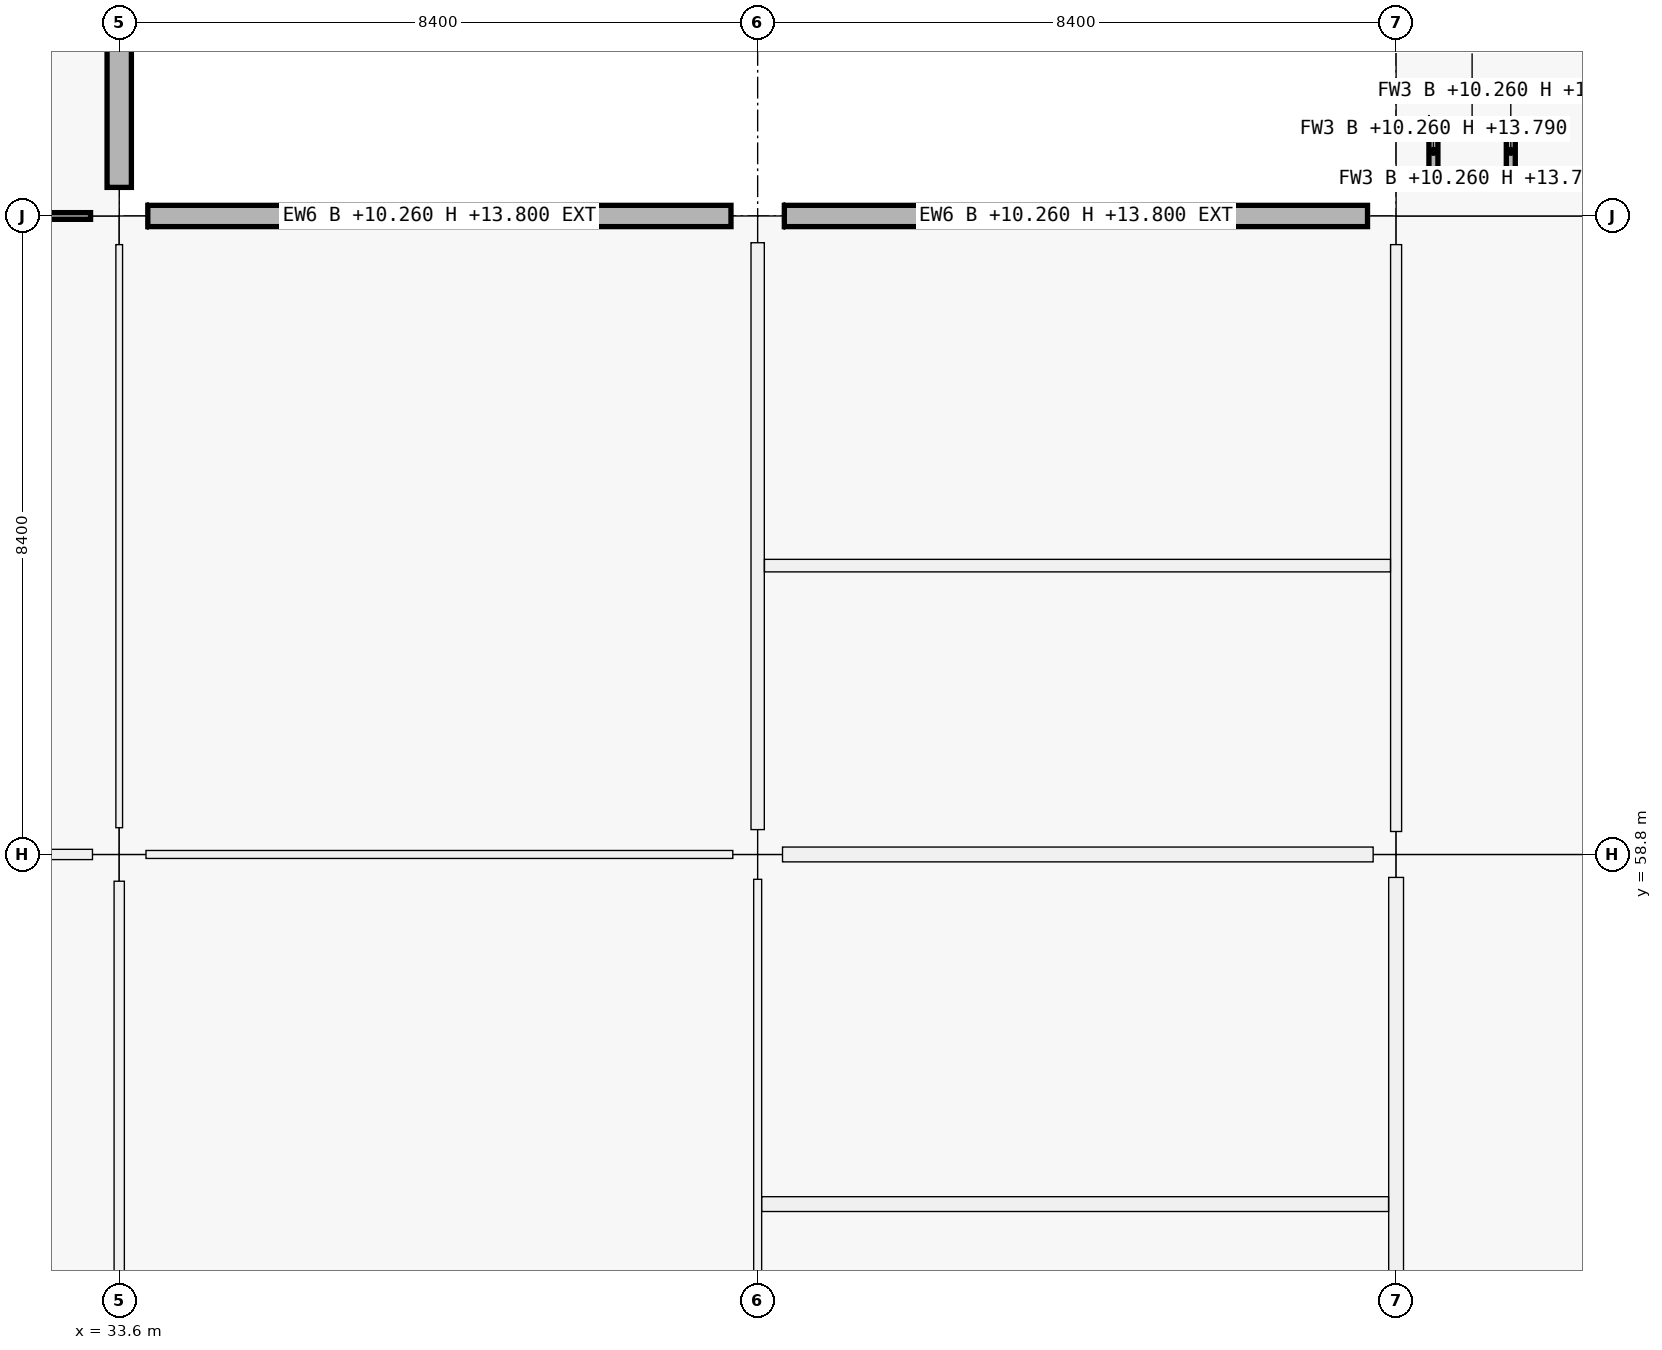
"""IFC4 building model, lengths in metres.
Left out: names, types, materials, properties, quantities, classifications, styles, units other than length and angle.
Written with IfcOpenShell. Run it as: python <this file> out.ifc"""

import sys

from ifc_helpers import new_model, si_unit, direction, frame, frame_2d, origin, origin_2d, place, context, subcontext, project, spatial, rectangle, extrude, element, fill, save


model = new_model("IFC4")
c1 = context("Model", 3, precision=1e-05, world=origin(), true_north=direction((0.0, 1.0)))
c2 = subcontext(c1, "Body", "Model", "MODEL_VIEW")
j1 = project(units=[si_unit("LENGTHUNIT", "METRE"), si_unit("PLANEANGLEUNIT", "RADIAN")], contexts=[c1])
p1 = place(None, origin())
s1 = spatial("IfcSite", under=j1, at=p1, CompositionType="ELEMENT")
p2 = place(p1, origin())
s2 = spatial("IfcBuilding", under=s1, at=p2, CompositionType="ELEMENT")
p3 = place(p2, frame((0.0, 0.0, 10.26)))
s3 = spatial("IfcBuildingStorey", under=s2, at=p3, CompositionType="ELEMENT", Elevation=10.26)
p4 = place(p3, frame((33.6, 58.8, 0.0), z_axis=(0.0, 0.0, 1.0), x_axis=(1.0, 0.0, 0.0)))
e1 = element("IfcColumn", 1, at=p4, inside=s3, PredefinedType="COLUMN", context=c2, shape_type="SweptSolid", body=[
    extrude(rectangle(XDim=0.7, YDim=0.7, at=origin_2d()), origin(), (0.0, 0.0, 1.0), 4.5),
])
p5 = place(p3, frame((33.6, 67.2, 0.0), z_axis=(0.0, 0.0, 1.0), x_axis=(1.0, 0.0, 0.0)))
e2 = element("IfcColumn", 2, at=p5, inside=s3, PredefinedType="COLUMN", context=c2, shape_type="SweptSolid", body=[
    extrude(rectangle(XDim=0.75, YDim=0.75, at=origin_2d()), origin(), (0.0, 0.0, 1.0), 4.5),
])
p6 = place(p3, frame((42.0, 58.8, 0.0), z_axis=(0.0, 0.0, 1.0), x_axis=(1.0, 0.0, 0.0)))
e3 = element("IfcColumn", 3, at=p6, inside=s3, PredefinedType="COLUMN", context=c2, shape_type="SweptSolid", body=[
    extrude(rectangle(XDim=0.65, YDim=0.65, at=origin_2d()), origin(), (0.0, 0.0, 1.0), 4.5),
])
p7 = place(p3, frame((42.0, 67.2, 0.0), z_axis=(0.0, 0.0, 1.0), x_axis=(1.0, 0.0, 0.0)))
e4 = element("IfcColumn", 4, at=p7, inside=s3, PredefinedType="COLUMN", context=c2, shape_type="SweptSolid", body=[
    extrude(rectangle(XDim=0.7, YDim=0.7, at=origin_2d()), origin(), (0.0, 0.0, 1.0), 4.5),
])
p8 = place(p3, frame((50.4, 58.8, 0.0), z_axis=(0.0, 0.0, 1.0), x_axis=(1.0, 0.0, 0.0)))
e5 = element("IfcColumn", 5, at=p8, inside=s3, PredefinedType="COLUMN", context=c2, shape_type="SweptSolid", body=[
    extrude(rectangle(XDim=0.6, YDim=0.6, at=origin_2d()), origin(), (0.0, 0.0, 1.0), 4.5),
])
p9 = place(p3, frame((50.4, 67.2, 0.0), z_axis=(0.0, 0.0, 1.0), x_axis=(1.0, 0.0, 0.0)))
e6 = element("IfcColumn", 6, at=p9, inside=s3, PredefinedType="COLUMN", context=c2, shape_type="SweptSolid", body=[
    extrude(rectangle(XDim=0.75, YDim=0.75, at=origin_2d()), origin(), (0.0, 0.0, 1.0), 4.5),
])
p10 = place(p3, frame((33.6, 75.249, 0.0), z_axis=(0.0, 0.0, 1.0), x_axis=(0.0, -1.0, 0.0)))
e7 = element("IfcWall", 7, at=p10, inside=s3, PredefinedType="SOLIDWALL", context=c2, shape_type="SweptSolid", body=[
    extrude(rectangle(XDim=7.673, YDim=0.32, at=frame_2d((3.836, 0.0))), origin(), (0.0, 0.0, 1.0), 3.54),
])
p11 = place(p10, frame((2.486, 0.0, 0.9)))
e8 = element("IfcOpeningElement", 8, at=p11, cuts=e7, PredefinedType="OPENING", context=c2, shape_type="SweptSolid", body=[
    extrude(rectangle(XDim=2.7, YDim=1.2, at=frame_2d((1.35, 0.6))), frame((0.0, 0.16, 0.0), z_axis=(0.0, -1.0, 0.0), x_axis=(1.0, 0.0, 0.0)), (0.0, 0.0, 1.0), 0.32),
])
p12 = place(p3, frame((33.976, 67.2, 0.0), z_axis=(0.0, 0.0, 1.0), x_axis=(1.0, 0.0, 0.0)))
e9 = element("IfcWall", 9, at=p12, inside=s3, PredefinedType="SOLIDWALL", context=c2, shape_type="SweptSolid", body=[
    extrude(rectangle(XDim=7.673, YDim=0.28, at=frame_2d((3.836, 0.0))), origin(), (0.0, 0.0, 1.0), 3.54),
])
p13 = place(p12, frame((2.937, 0.0, 0.9)))
e10 = element("IfcOpeningElement", 10, at=p13, cuts=e9, PredefinedType="OPENING", context=c2, shape_type="SweptSolid", body=[
    extrude(rectangle(XDim=1.8, YDim=1.35, at=frame_2d((0.9, 0.675))), frame((0.0, 0.14, 0.0), z_axis=(0.0, -1.0, 0.0), x_axis=(1.0, 0.0, 0.0)), (0.0, 0.0, 1.0), 0.28),
])
p14 = place(p3, frame((42.351, 67.2, 0.0), z_axis=(0.0, 0.0, 1.0), x_axis=(1.0, 0.0, 0.0)))
e11 = element("IfcWall", 11, at=p14, inside=s3, PredefinedType="SOLIDWALL", context=c2, shape_type="SweptSolid", body=[
    extrude(rectangle(XDim=7.673, YDim=0.28, at=frame_2d((3.836, 0.0))), origin(), (0.0, 0.0, 1.0), 3.54),
])
p15 = place(p14, frame((3.136, 0.0, 0.9)))
e12 = element("IfcOpeningElement", 12, at=p15, cuts=e11, PredefinedType="OPENING", context=c2, shape_type="SweptSolid", body=[
    extrude(rectangle(XDim=1.4, YDim=1.75, at=frame_2d((0.7, 0.875))), frame((0.0, 0.14, 0.0), z_axis=(0.0, -1.0, 0.0), x_axis=(1.0, 0.0, 0.0)), (0.0, 0.0, 1.0), 0.28),
])
for number, where, z_axis, x_axis in (
    (13, (50.832, 67.691, 0.0), (0.0, 0.0, 1.0), (1.0, 0.0, 0.0)),
    (14, (50.832, 68.409, 0.0), (0.0, 0.0, 1.0), (1.0, 0.0, 0.0)),
):
    element("IfcWall", number, at=place(p3, frame(where, z_axis=z_axis, x_axis=x_axis)), inside=s3, PredefinedType="PARTITIONING", context=c2, shape_type="SweptSolid", body=[
        extrude(rectangle(XDim=1.136, YDim=0.118, at=frame_2d((0.568, 0.0))), origin(), (0.0, 0.0, 1.0), 3.53),
    ])
for number, where, z_axis, x_axis in (
    (15, (50.891, 67.75, 0.0), (0.0, 0.0, 1.0), (0.0, 1.0, 0.0)),
    (16, (51.909, 67.75, 0.0), (0.0, 0.0, 1.0), (0.0, 1.0, 0.0)),
):
    element("IfcWall", number, at=place(p3, frame(where, z_axis=z_axis, x_axis=x_axis)), inside=s3, PredefinedType="PARTITIONING", context=c2, shape_type="SweptSolid", body=[
        extrude(rectangle(XDim=0.6, YDim=0.118, at=frame_2d((0.3, 0.0))), origin(), (0.0, 0.0, 1.0), 3.53),
    ])
p16 = place(p3, frame((25.577, 58.8, 0.0), z_axis=(0.0, 0.0, 1.0), x_axis=(1.0, 0.0, 0.0)))
e17 = element("IfcWall", 17, at=p16, inside=s3, PredefinedType="PARTITIONING", context=c2, shape_type="SweptSolid", body=[
    extrude(rectangle(XDim=7.671, YDim=0.135, at=frame_2d((3.835, 0.0))), origin(), (0.0, 0.0, 1.0), 3.37),
])
p17 = place(p16, frame((3.306, 0.0, 0.0)))
e18 = element("IfcOpeningElement", 18, at=p17, cuts=e17, PredefinedType="OPENING", context=c2, shape_type="SweptSolid", body=[
    extrude(rectangle(XDim=1.06, YDim=2.25, at=frame_2d((0.53, 1.125))), frame((0.0, 0.067, 0.0), z_axis=(0.0, -1.0, 0.0), x_axis=(1.0, 0.0, 0.0)), (0.0, 0.0, 1.0), 0.135),
])
p18 = place(p3, frame((25.552, 67.2, 0.0), z_axis=(0.0, 0.0, 1.0), x_axis=(1.0, 0.0, 0.0)))
e19 = element("IfcWall", 19, at=p18, inside=s3, PredefinedType="PARTITIONING", context=c2, shape_type="SweptSolid", body=[
    extrude(rectangle(XDim=7.671, YDim=0.088, at=frame_2d((3.835, 0.0))), origin(), (0.0, 0.0, 1.0), 3.37),
])
p19 = place(p18, frame((3.316, 0.0, 0.0)))
e20 = element("IfcOpeningElement", 20, at=p19, cuts=e19, PredefinedType="OPENING", context=c2, shape_type="SweptSolid", body=[
    extrude(rectangle(XDim=1.04, YDim=2.2, at=frame_2d((0.52, 1.1))), frame((0.0, 0.044, 0.0), z_axis=(0.0, -1.0, 0.0), x_axis=(1.0, 0.0, 0.0)), (0.0, 0.0, 1.0), 0.088),
])
p20 = place(p3, frame((33.952, 58.8, 0.0), z_axis=(0.0, 0.0, 1.0), x_axis=(1.0, 0.0, 0.0)))
e21 = element("IfcWall", 21, at=p20, inside=s3, PredefinedType="PARTITIONING", context=c2, shape_type="SweptSolid", body=[
    extrude(rectangle(XDim=7.721, YDim=0.105, at=frame_2d((3.861, 0.0))), origin(), (0.0, 0.0, 1.0), 3.37),
])
p21 = place(p20, frame((3.351, 0.0, 0.0)))
e22 = element("IfcOpeningElement", 22, at=p21, cuts=e21, PredefinedType="OPENING", context=c2, shape_type="SweptSolid", body=[
    extrude(rectangle(XDim=1.02, YDim=2.2, at=frame_2d((0.51, 1.1))), frame((0.0, 0.052, 0.0), z_axis=(0.0, -1.0, 0.0), x_axis=(1.0, 0.0, 0.0)), (0.0, 0.0, 1.0), 0.105),
])
p22 = place(p3, frame((42.327, 58.8, 0.0), z_axis=(0.0, 0.0, 1.0), x_axis=(1.0, 0.0, 0.0)))
e23 = element("IfcWall", 23, at=p22, inside=s3, PredefinedType="PARTITIONING", context=c2, shape_type="SweptSolid", body=[
    extrude(rectangle(XDim=7.771, YDim=0.195, at=frame_2d((3.885, 0.0))), origin(), (0.0, 0.0, 1.0), 3.37),
])
p23 = place(p3, frame((33.6, 50.777, 0.0), z_axis=(0.0, 0.0, 1.0), x_axis=(0.0, 1.0, 0.0)))
e24 = element("IfcWall", 24, at=p23, inside=s3, PredefinedType="PARTITIONING", context=c2, shape_type="SweptSolid", body=[
    extrude(rectangle(XDim=7.671, YDim=0.135, at=frame_2d((3.835, 0.0))), origin(), (0.0, 0.0, 1.0), 3.37),
])
p24 = place(p23, frame((3.336, 0.0, 0.0)))
e25 = element("IfcOpeningElement", 25, at=p24, cuts=e24, PredefinedType="OPENING", context=c2, shape_type="SweptSolid", body=[
    extrude(rectangle(XDim=1.0, YDim=2.2, at=frame_2d((0.5, 1.1))), frame((0.0, 0.067, 0.0), z_axis=(0.0, -1.0, 0.0), x_axis=(1.0, 0.0, 0.0)), (0.0, 0.0, 1.0), 0.135),
])
p25 = place(p3, frame((33.6, 59.152, 0.0), z_axis=(0.0, 0.0, 1.0), x_axis=(0.0, 1.0, 0.0)))
e26 = element("IfcWall", 26, at=p25, inside=s3, PredefinedType="PARTITIONING", context=c2, shape_type="SweptSolid", body=[
    extrude(rectangle(XDim=7.671, YDim=0.088, at=frame_2d((3.835, 0.0))), origin(), (0.0, 0.0, 1.0), 3.37),
])
p26 = place(p25, frame((3.365, 0.0, 0.0)))
e27 = element("IfcOpeningElement", 27, at=p26, cuts=e26, PredefinedType="OPENING", context=c2, shape_type="SweptSolid", body=[
    extrude(rectangle(XDim=0.94, YDim=2.15, at=frame_2d((0.47, 1.075))), frame((0.0, 0.044, 0.0), z_axis=(0.0, -1.0, 0.0), x_axis=(1.0, 0.0, 0.0)), (0.0, 0.0, 1.0), 0.088),
])
p27 = place(p3, frame((42.0, 50.702, 0.0), z_axis=(0.0, 0.0, 1.0), x_axis=(0.0, 1.0, 0.0)))
e28 = element("IfcWall", 28, at=p27, inside=s3, PredefinedType="PARTITIONING", context=c2, shape_type="SweptSolid", body=[
    extrude(rectangle(XDim=7.771, YDim=0.105, at=frame_2d((3.885, 0.0))), origin(), (0.0, 0.0, 1.0), 3.37),
])
p28 = place(p3, frame((42.0, 59.127, 0.0), z_axis=(0.0, 0.0, 1.0), x_axis=(0.0, 1.0, 0.0)))
e29 = element("IfcWall", 29, at=p28, inside=s3, PredefinedType="PARTITIONING", context=c2, shape_type="SweptSolid", body=[
    extrude(rectangle(XDim=7.721, YDim=0.175, at=frame_2d((3.86, 0.0))), origin(), (0.0, 0.0, 1.0), 3.37),
])
p29 = place(p3, frame((50.4, 50.727, 0.0), z_axis=(0.0, 0.0, 1.0), x_axis=(0.0, 1.0, 0.0)))
e30 = element("IfcWall", 30, at=p29, inside=s3, PredefinedType="PARTITIONING", context=c2, shape_type="SweptSolid", body=[
    extrude(rectangle(XDim=7.771, YDim=0.195, at=frame_2d((3.885, 0.0))), origin(), (0.0, 0.0, 1.0), 3.37),
])
p30 = place(p29, frame((1.173, 0.0, 0.0)))
e31 = element("IfcOpeningElement", 31, at=p30, cuts=e30, PredefinedType="OPENING", context=c2, shape_type="SweptSolid", body=[
    extrude(rectangle(XDim=1.08, YDim=2.25, at=frame_2d((0.54, 1.125))), frame((0.0, 0.098, 0.0), z_axis=(0.0, -1.0, 0.0), x_axis=(1.0, 0.0, 0.0)), (0.0, 0.0, 1.0), 0.195),
])
p31 = place(p29, frame((5.103, 0.0, 0.0)))
e32 = element("IfcOpeningElement", 32, at=p31, cuts=e30, PredefinedType="OPENING", context=c2, shape_type="SweptSolid", body=[
    extrude(rectangle(XDim=1.06, YDim=2.25, at=frame_2d((0.53, 1.125))), frame((0.0, 0.098, 0.0), z_axis=(0.0, -1.0, 0.0), x_axis=(1.0, 0.0, 0.0)), (0.0, 0.0, 1.0), 0.195),
])
p32 = place(p3, frame((50.4, 59.102, 0.0), z_axis=(0.0, 0.0, 1.0), x_axis=(0.0, 1.0, 0.0)))
e33 = element("IfcWall", 33, at=p32, inside=s3, PredefinedType="PARTITIONING", context=c2, shape_type="SweptSolid", body=[
    extrude(rectangle(XDim=7.721, YDim=0.145, at=frame_2d((3.86, 0.0))), origin(), (0.0, 0.0, 1.0), 3.37),
])
p33 = place(p32, frame((1.218, 0.0, 0.0)))
e34 = element("IfcOpeningElement", 34, at=p33, cuts=e33, PredefinedType="OPENING", context=c2, shape_type="SweptSolid", body=[
    extrude(rectangle(XDim=1.04, YDim=2.2, at=frame_2d((0.52, 1.1))), frame((0.0, 0.073, 0.0), z_axis=(0.0, -1.0, 0.0), x_axis=(1.0, 0.0, 0.0)), (0.0, 0.0, 1.0), 0.145),
])
p34 = place(p32, frame((5.148, 0.0, 0.0)))
e35 = element("IfcOpeningElement", 35, at=p34, cuts=e33, PredefinedType="OPENING", context=c2, shape_type="SweptSolid", body=[
    extrude(rectangle(XDim=1.02, YDim=2.2, at=frame_2d((0.51, 1.1))), frame((0.0, 0.073, 0.0), z_axis=(0.0, -1.0, 0.0), x_axis=(1.0, 0.0, 0.0)), (0.0, 0.0, 1.0), 0.145),
])
p35 = place(p3, frame((42.054, 54.2, 0.0), z_axis=(0.0, 0.0, 1.0), x_axis=(1.0, 0.0, 0.0)))
e36 = element("IfcWall", 36, at=p35, inside=s3, PredefinedType="PARTITIONING", context=c2, shape_type="SweptSolid", body=[
    extrude(rectangle(XDim=8.246, YDim=0.195, at=frame_2d((4.123, 0.0))), origin(), (0.0, 0.0, 1.0), 3.37),
])
p36 = place(p3, frame((42.09, 62.6, 0.0), z_axis=(0.0, 0.0, 1.0), x_axis=(1.0, 0.0, 0.0)))
e37 = element("IfcWall", 37, at=p36, inside=s3, PredefinedType="PARTITIONING", context=c2, shape_type="SweptSolid", body=[
    extrude(rectangle(XDim=8.236, YDim=0.165, at=frame_2d((4.118, 0.0))), origin(), (0.0, 0.0, 1.0), 3.37),
])
p37 = place(p13, origin())
e38 = element("IfcWindow", 38, at=p37, inside=s3, PartitioningType="SINGLE_PANEL", PredefinedType="WINDOW", context=c2, shape_type="SweptSolid", body=[
    extrude(rectangle(XDim=1.8, YDim=1.35, at=frame_2d((0.9, 0.675))), frame((0.0, 0.03, 0.0), z_axis=(0.0, -1.0, 0.0), x_axis=(1.0, 0.0, 0.0)), (0.0, 0.0, 1.0), 0.06),
])
fill(e10, e38)
p38 = place(p15, origin())
e39 = element("IfcWindow", 39, at=p38, inside=s3, PartitioningType="SINGLE_PANEL", PredefinedType="WINDOW", context=c2, shape_type="SweptSolid", body=[
    extrude(rectangle(XDim=1.4, YDim=1.75, at=frame_2d((0.7, 0.875))), frame((0.0, 0.03, 0.0), z_axis=(0.0, -1.0, 0.0), x_axis=(1.0, 0.0, 0.0)), (0.0, 0.0, 1.0), 0.06),
])
fill(e12, e39)
p39 = place(p31, origin())
e40 = element("IfcDoor", 40, at=p39, inside=s3, OperationType="SINGLE_SWING_LEFT", PredefinedType="DOOR", context=c2, shape_type="SweptSolid", body=[
    extrude(rectangle(XDim=1.06, YDim=2.25, at=frame_2d((0.53, 1.125))), frame((0.0, 0.025, 0.0), z_axis=(0.0, -1.0, 0.0), x_axis=(1.0, 0.0, 0.0)), (0.0, 0.0, 1.0), 0.05),
])
fill(e32, e40)
p40 = place(p33, origin())
e41 = element("IfcDoor", 41, at=p40, inside=s3, OperationType="SINGLE_SWING_RIGHT", PredefinedType="DOOR", context=c2, shape_type="SweptSolid", body=[
    extrude(rectangle(XDim=1.04, YDim=2.2, at=frame_2d((0.52, 1.1))), frame((0.0, 0.025, 0.0), z_axis=(0.0, -1.0, 0.0), x_axis=(1.0, 0.0, 0.0)), (0.0, 0.0, 1.0), 0.05),
])
fill(e34, e41)
p41 = place(p34, origin())
e42 = element("IfcDoor", 42, at=p41, inside=s3, OperationType="SINGLE_SWING_LEFT", PredefinedType="DOOR", context=c2, shape_type="SweptSolid", body=[
    extrude(rectangle(XDim=1.02, YDim=2.2, at=frame_2d((0.51, 1.1))), frame((0.0, 0.025, 0.0), z_axis=(0.0, -1.0, 0.0), x_axis=(1.0, 0.0, 0.0)), (0.0, 0.0, 1.0), 0.05),
])
fill(e35, e42)
p42 = place(p21, origin())
e43 = element("IfcDoor", 43, at=p42, inside=s3, OperationType="SINGLE_SWING_LEFT", PredefinedType="DOOR", context=c2, shape_type="SweptSolid", body=[
    extrude(rectangle(XDim=1.02, YDim=2.2, at=frame_2d((0.51, 1.1))), frame((0.0, 0.025, 0.0), z_axis=(0.0, -1.0, 0.0), x_axis=(1.0, 0.0, 0.0)), (0.0, 0.0, 1.0), 0.05),
])
fill(e22, e43)
p43 = place(p24, origin())
e44 = element("IfcDoor", 44, at=p43, inside=s3, OperationType="SINGLE_SWING_LEFT", PredefinedType="DOOR", context=c2, shape_type="SweptSolid", body=[
    extrude(rectangle(XDim=1.0, YDim=2.2, at=frame_2d((0.5, 1.1))), frame((0.0, 0.025, 0.0), z_axis=(0.0, -1.0, 0.0), x_axis=(1.0, 0.0, 0.0)), (0.0, 0.0, 1.0), 0.05),
])
fill(e25, e44)
p44 = place(p26, origin())
e45 = element("IfcDoor", 45, at=p44, inside=s3, OperationType="SINGLE_SWING_LEFT", PredefinedType="DOOR", context=c2, shape_type="SweptSolid", body=[
    extrude(rectangle(XDim=0.94, YDim=2.15, at=frame_2d((0.47, 1.075))), frame((0.0, 0.025, 0.0), z_axis=(0.0, -1.0, 0.0), x_axis=(1.0, 0.0, 0.0)), (0.0, 0.0, 1.0), 0.05),
])
fill(e27, e45)
save(model, sys.argv[1])
